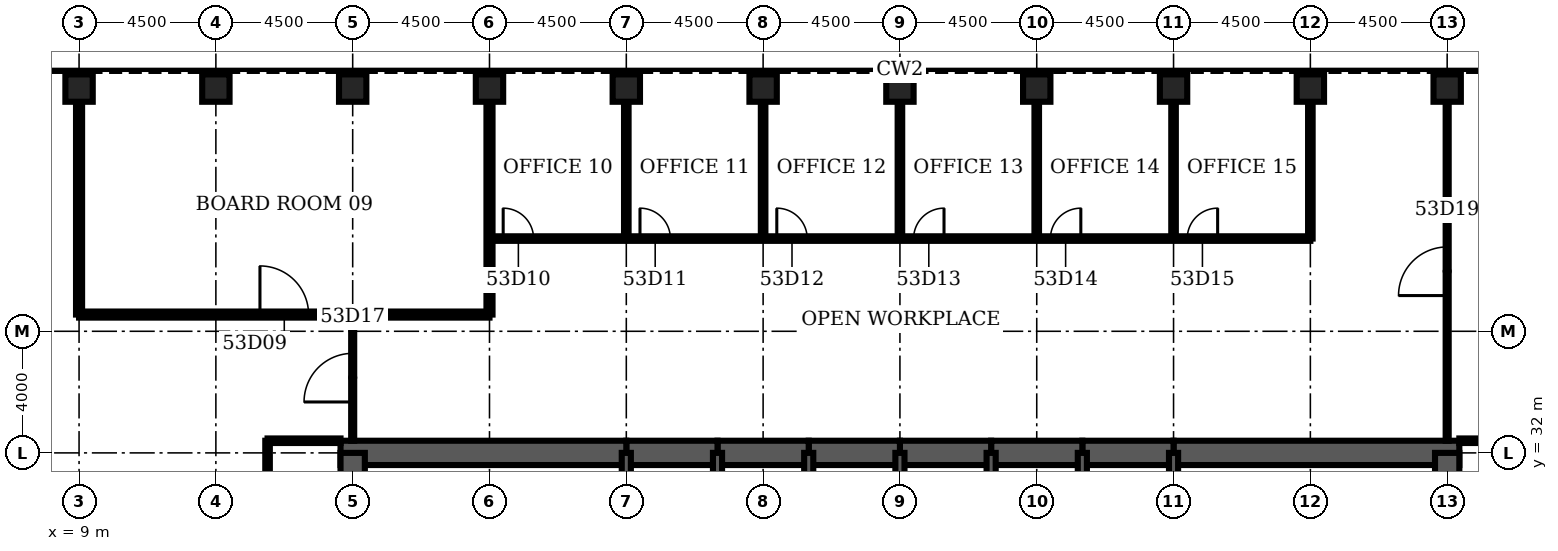
"""IFC4 building model, lengths in metres.
Left out: names, types, materials, properties, quantities, classifications, styles, units other than length and angle.
Written with IfcOpenShell. Run it as: python <this file> out.ifc"""

import sys

from ifc_helpers import new_model, si_unit, direction, frame, frame_2d, origin, origin_2d, place, context, subcontext, project, spatial, rectangle, hollow_rectangle, extrude, element, fill, save


model = new_model("IFC4")
c1 = context("Model", 3, precision=1e-05, world=origin(), true_north=direction((0.0, 1.0)))
c2 = subcontext(c1, "Body", "Model", "MODEL_VIEW")
j1 = project(units=[si_unit("LENGTHUNIT", "METRE"), si_unit("PLANEANGLEUNIT", "RADIAN")], contexts=[c1])
p1 = place(None, origin())
s1 = spatial("IfcSite", under=j1, at=p1, CompositionType="ELEMENT")
p2 = place(p1, origin())
s2 = spatial("IfcBuilding", under=s1, at=p2, CompositionType="ELEMENT")
p3 = place(p2, frame((0.0, 0.0, 236.2)))
s3 = spatial("IfcBuildingStorey", under=s2, at=p3, CompositionType="ELEMENT", Elevation=236.2)
for number, where, z_axis, x_axis in (
    (1, (54.0, 44.0, 0.0), (0.0, 0.0, 1.0), (0.0, 1.0, 0.0)),
    (2, (49.5, 44.0, 0.0), (0.0, 0.0, 1.0), (0.0, 1.0, 0.0)),
    (3, (45.0, 44.0, 0.0), (0.0, 0.0, 1.0), (0.0, 1.0, 0.0)),
    (4, (40.5, 44.0, 0.0), (0.0, 0.0, 1.0), (0.0, 1.0, 0.0)),
    (5, (36.0, 44.0, 0.0), (0.0, 0.0, 1.0), (0.0, 1.0, 0.0)),
    (6, (31.5, 44.0, 0.0), (0.0, 0.0, 1.0), (0.0, 1.0, 0.0)),
    (7, (27.0, 44.0, 0.0), (0.0, 0.0, 1.0), (0.0, 1.0, 0.0)),
    (8, (22.5, 44.0, 0.0), (0.0, 0.0, 1.0), (0.0, 1.0, 0.0)),
    (9, (18.0, 44.0, 0.0), (0.0, 0.0, 1.0), (0.0, 1.0, 0.0)),
    (10, (13.5, 44.0, 0.0), (0.0, 0.0, 1.0), (0.0, 1.0, 0.0)),
    (11, (9.0, 44.0, 0.0), (0.0, 0.0, 1.0), (0.0, 1.0, 0.0)),
):
    element("IfcColumn", number, at=place(p3, frame(where, z_axis=z_axis, x_axis=x_axis)), inside=s3, PredefinedType="COLUMN", context=c2, shape_type="SweptSolid", body=[
        extrude(hollow_rectangle(XDim=0.9, YDim=0.9, WallThickness=0.08, at=origin_2d()), origin(), (0.0, 0.0, 1.0), 4.2),
    ])
p4 = place(p3, frame((54.4, 32.0, 0.0), z_axis=(0.0, 0.0, 1.0), x_axis=(-1.0, 0.0, 0.0)))
e12 = element("IfcWall", 12, at=p4, inside=s3, PredefinedType="SHEAR", context=c2, shape_type="SweptSolid", body=[
    extrude(rectangle(XDim=9.4, YDim=0.8, at=frame_2d((4.7, 0.0))), origin(), (0.0, 0.0, 1.0), 4.2),
])
for number, where, z_axis, x_axis in (
    (13, (45.0, 32.0, 0.0), (0.0, 0.0, 1.0), (-1.0, 0.0, 0.0)),
    (14, (42.0, 32.0, 0.0), (0.0, 0.0, 1.0), (-1.0, 0.0, 0.0)),
    (15, (39.0, 32.0, 0.0), (0.0, 0.0, 1.0), (-1.0, 0.0, 0.0)),
    (16, (36.0, 32.0, 0.0), (0.0, 0.0, 1.0), (-1.0, 0.0, 0.0)),
    (17, (33.0, 32.0, 0.0), (0.0, 0.0, 1.0), (-1.0, 0.0, 0.0)),
    (18, (30.0, 32.0, 0.0), (0.0, 0.0, 1.0), (-1.0, 0.0, 0.0)),
):
    element("IfcWall", number, at=place(p3, frame(where, z_axis=z_axis, x_axis=x_axis)), inside=s3, PredefinedType="SHEAR", context=c2, shape_type="SweptSolid", body=[
        extrude(rectangle(XDim=3.0, YDim=0.8, at=frame_2d((1.5, 0.0))), origin(), (0.0, 0.0, 1.0), 4.2),
    ])
p5 = place(p3, frame((27.0, 32.0, 0.0), z_axis=(0.0, 0.0, 1.0), x_axis=(-1.0, 0.0, 0.0)))
e19 = element("IfcWall", 19, at=p5, inside=s3, PredefinedType="SHEAR", context=c2, shape_type="SweptSolid", body=[
    extrude(rectangle(XDim=9.4, YDim=0.8, at=frame_2d((4.7, 0.0))), origin(), (0.0, 0.0, 1.0), 4.2),
])
for number, where, z_axis, x_axis in (
    (20, (18.0, 32.0, 0.0), (0.0, 0.0, 1.0), (0.0, -1.0, 0.0)),
    (21, (54.0, 28.8, 0.0), (0.0, 0.0, 1.0), (0.0, 1.0, 0.0)),
):
    element("IfcWall", number, at=place(p3, frame(where, z_axis=z_axis, x_axis=x_axis)), inside=s3, PredefinedType="SHEAR", context=c2, shape_type="SweptSolid", body=[
        extrude(rectangle(XDim=3.2, YDim=0.8, at=frame_2d((1.6, 0.0))), origin(), (0.0, 0.0, 1.0), 4.2),
    ])
for number, where, z_axis, x_axis in (
    (22, (27.0, 28.8, 0.0), (0.0, 0.0, 1.0), (0.0, 1.0, 0.0)),
    (23, (30.0, 28.8, 0.0), (0.0, 0.0, 1.0), (0.0, 1.0, 0.0)),
    (24, (33.0, 28.8, 0.0), (0.0, 0.0, 1.0), (0.0, 1.0, 0.0)),
    (25, (36.0, 28.8, 0.0), (0.0, 0.0, 1.0), (0.0, 1.0, 0.0)),
    (26, (39.0, 28.8, 0.0), (0.0, 0.0, 1.0), (0.0, 1.0, 0.0)),
    (27, (42.0, 28.8, 0.0), (0.0, 0.0, 1.0), (0.0, 1.0, 0.0)),
    (28, (45.0, 28.8, 0.0), (0.0, 0.0, 1.0), (0.0, 1.0, 0.0)),
):
    element("IfcWall", number, at=place(p3, frame(where, z_axis=z_axis, x_axis=x_axis)), inside=s3, PredefinedType="SOLIDWALL", context=c2, shape_type="SweptSolid", body=[
        extrude(rectangle(XDim=3.2, YDim=0.3, at=frame_2d((1.6, 0.0))), origin(), (0.0, 0.0, 1.0), 4.2),
    ])
for number, where, z_axis, x_axis in (
    (29, (15.2, 32.4, 0.0), (0.0, 0.0, 1.0), (1.0, 0.0, 0.0)),
    (30, (54.4, 32.4, 0.0), (0.0, 0.0, 1.0), (1.0, 0.0, 0.0)),
):
    element("IfcWall", number, at=place(p3, frame(where, z_axis=z_axis, x_axis=x_axis)), inside=s3, PredefinedType="PARTITIONING", context=c2, shape_type="SweptSolid", body=[
        extrude(rectangle(XDim=2.4, YDim=0.15, at=frame_2d((1.2, 0.0))), origin(), (0.0, 0.0, 1.0), 3.0),
    ])
p6 = place(p3, frame((9.0, 36.55, 0.0), z_axis=(0.0, 0.0, 1.0), x_axis=(1.0, 0.0, 0.0)))
e31 = element("IfcWall", 31, at=p6, inside=s3, PredefinedType="PARTITIONING", context=c2, shape_type="SweptSolid", body=[
    extrude(rectangle(XDim=13.5, YDim=0.2, at=frame_2d((6.75, 0.0))), origin(), (0.0, 0.0, 1.0), 3.0),
])
p7 = place(p6, frame((5.95, 0.0, 0.0)))
e32 = element("IfcOpeningElement", 32, at=p7, cuts=e31, PredefinedType="OPENING", context=c2, shape_type="SweptSolid", body=[
    extrude(rectangle(XDim=1.6, YDim=2.1, at=frame_2d((0.8, 1.05))), frame((0.0, 0.11, 0.0), z_axis=(0.0, -1.0, 0.0), x_axis=(1.0, 0.0, 0.0)), (0.0, 0.0, 1.0), 0.22),
])
p8 = place(p3, frame((22.5, 39.05, 0.0), z_axis=(0.0, 0.0, 1.0), x_axis=(1.0, 0.0, 0.0)))
e33 = element("IfcWall", 33, at=p8, inside=s3, PredefinedType="PARTITIONING", context=c2, shape_type="SweptSolid", body=[
    extrude(rectangle(XDim=27.0, YDim=0.15, at=frame_2d((13.5, 0.0))), origin(), (0.0, 0.0, 1.0), 3.0),
])
p9 = place(p8, frame((0.45, 0.0, 0.0)))
e34 = element("IfcOpeningElement", 34, at=p9, cuts=e33, PredefinedType="OPENING", context=c2, shape_type="SweptSolid", body=[
    extrude(rectangle(XDim=1.0, YDim=2.1, at=frame_2d((0.5, 1.05))), frame((0.0, 0.085, 0.0), z_axis=(0.0, -1.0, 0.0), x_axis=(1.0, 0.0, 0.0)), (0.0, 0.0, 1.0), 0.17),
])
p10 = place(p8, frame((4.95, 0.0, 0.0)))
e35 = element("IfcOpeningElement", 35, at=p10, cuts=e33, PredefinedType="OPENING", context=c2, shape_type="SweptSolid", body=[
    extrude(rectangle(XDim=1.0, YDim=2.1, at=frame_2d((0.5, 1.05))), frame((0.0, 0.085, 0.0), z_axis=(0.0, -1.0, 0.0), x_axis=(1.0, 0.0, 0.0)), (0.0, 0.0, 1.0), 0.17),
])
p11 = place(p8, frame((9.45, 0.0, 0.0)))
e36 = element("IfcOpeningElement", 36, at=p11, cuts=e33, PredefinedType="OPENING", context=c2, shape_type="SweptSolid", body=[
    extrude(rectangle(XDim=1.0, YDim=2.1, at=frame_2d((0.5, 1.05))), frame((0.0, 0.085, 0.0), z_axis=(0.0, -1.0, 0.0), x_axis=(1.0, 0.0, 0.0)), (0.0, 0.0, 1.0), 0.17),
])
p12 = place(p8, frame((13.95, 0.0, 0.0)))
e37 = element("IfcOpeningElement", 37, at=p12, cuts=e33, PredefinedType="OPENING", context=c2, shape_type="SweptSolid", body=[
    extrude(rectangle(XDim=1.0, YDim=2.1, at=frame_2d((0.5, 1.05))), frame((0.0, 0.085, 0.0), z_axis=(0.0, -1.0, 0.0), x_axis=(1.0, 0.0, 0.0)), (0.0, 0.0, 1.0), 0.17),
])
p13 = place(p8, frame((18.45, 0.0, 0.0)))
e38 = element("IfcOpeningElement", 38, at=p13, cuts=e33, PredefinedType="OPENING", context=c2, shape_type="SweptSolid", body=[
    extrude(rectangle(XDim=1.0, YDim=2.1, at=frame_2d((0.5, 1.05))), frame((0.0, 0.085, 0.0), z_axis=(0.0, -1.0, 0.0), x_axis=(1.0, 0.0, 0.0)), (0.0, 0.0, 1.0), 0.17),
])
p14 = place(p8, frame((22.95, 0.0, 0.0)))
e39 = element("IfcOpeningElement", 39, at=p14, cuts=e33, PredefinedType="OPENING", context=c2, shape_type="SweptSolid", body=[
    extrude(rectangle(XDim=1.0, YDim=2.1, at=frame_2d((0.5, 1.05))), frame((0.0, 0.085, 0.0), z_axis=(0.0, -1.0, 0.0), x_axis=(1.0, 0.0, 0.0)), (0.0, 0.0, 1.0), 0.17),
])
p15 = place(p3, frame((9.0, 36.55, 0.0), z_axis=(0.0, 0.0, 1.0), x_axis=(0.0, 1.0, 0.0)))
e40 = element("IfcWall", 40, at=p15, inside=s3, PredefinedType="PARTITIONING", context=c2, shape_type="SweptSolid", body=[
    extrude(rectangle(XDim=7.0, YDim=0.2, at=frame_2d((3.5, 0.0))), origin(), (0.0, 0.0, 1.0), 3.0),
])
p16 = place(p3, frame((15.2, 13.8, 0.0), z_axis=(0.0, 0.0, 1.0), x_axis=(0.0, 1.0, 0.0)))
e41 = element("IfcWall", 41, at=p16, inside=s3, PredefinedType="PARTITIONING", context=c2, shape_type="SweptSolid", body=[
    extrude(rectangle(XDim=18.6, YDim=0.15, at=frame_2d((9.3, 0.0))), origin(), (0.0, 0.0, 1.0), 3.0),
])
p17 = place(p16, frame((8.7, 0.0, 0.0)))
e42 = element("IfcOpeningElement", 42, at=p17, cuts=e41, PredefinedType="OPENING", context=c2, shape_type="SweptSolid", body=[
    extrude(rectangle(XDim=1.2, YDim=2.1, at=frame_2d((0.6, 1.05))), frame((0.0, 0.085, 0.0), z_axis=(0.0, -1.0, 0.0), x_axis=(1.0, 0.0, 0.0)), (0.0, 0.0, 1.0), 0.17),
])
p18 = place(p3, frame((18.0, 32.4, 0.0), z_axis=(0.0, 0.0, 1.0), x_axis=(0.0, 1.0, 0.0)))
e43 = element("IfcWall", 43, at=p18, inside=s3, PredefinedType="PARTITIONING", context=c2, shape_type="SweptSolid", body=[
    extrude(rectangle(XDim=4.15, YDim=0.1, at=frame_2d((2.075, 0.0))), origin(), (0.0, 0.0, 1.0), 3.0),
])
p19 = place(p18, frame((1.275, 0.0, 0.0)))
e44 = element("IfcOpeningElement", 44, at=p19, cuts=e43, PredefinedType="OPENING", context=c2, shape_type="SweptSolid", body=[
    extrude(rectangle(XDim=1.6, YDim=2.1, at=frame_2d((0.8, 1.05))), frame((0.0, 0.06, 0.0), z_axis=(0.0, -1.0, 0.0), x_axis=(1.0, 0.0, 0.0)), (0.0, 0.0, 1.0), 0.12),
])
p20 = place(p3, frame((22.5, 36.55, 0.0), z_axis=(0.0, 0.0, 1.0), x_axis=(0.0, 1.0, 0.0)))
e45 = element("IfcWall", 45, at=p20, inside=s3, PredefinedType="PARTITIONING", context=c2, shape_type="SweptSolid", body=[
    extrude(rectangle(XDim=7.0, YDim=0.2, at=frame_2d((3.5, 0.0))), origin(), (0.0, 0.0, 1.0), 3.0),
])
for number, where, z_axis, x_axis in (
    (46, (27.0, 39.05, 0.0), (0.0, 0.0, 1.0), (0.0, 1.0, 0.0)),
    (47, (31.5, 39.05, 0.0), (0.0, 0.0, 1.0), (0.0, 1.0, 0.0)),
    (48, (36.0, 39.05, 0.0), (0.0, 0.0, 1.0), (0.0, 1.0, 0.0)),
    (49, (40.5, 39.05, 0.0), (0.0, 0.0, 1.0), (0.0, 1.0, 0.0)),
    (50, (45.0, 39.05, 0.0), (0.0, 0.0, 1.0), (0.0, 1.0, 0.0)),
    (51, (49.5, 39.05, 0.0), (0.0, 0.0, 1.0), (0.0, 1.0, 0.0)),
):
    element("IfcWall", number, at=place(p3, frame(where, z_axis=z_axis, x_axis=x_axis)), inside=s3, PredefinedType="PARTITIONING", context=c2, shape_type="SweptSolid", body=[
        extrude(rectangle(XDim=4.5, YDim=0.15, at=frame_2d((2.25, 0.0))), origin(), (0.0, 0.0, 1.0), 3.0),
    ])
p21 = place(p3, frame((54.0, 32.4, 0.0), z_axis=(0.0, 0.0, 1.0), x_axis=(0.0, 1.0, 0.0)))
e52 = element("IfcWall", 52, at=p21, inside=s3, PredefinedType="PARTITIONING", context=c2, shape_type="SweptSolid", body=[
    extrude(rectangle(XDim=11.15, YDim=0.1, at=frame_2d((5.575, 0.0))), origin(), (0.0, 0.0, 1.0), 3.0),
])
p22 = place(p21, frame((4.775, 0.0, 0.0)))
e53 = element("IfcOpeningElement", 53, at=p22, cuts=e52, PredefinedType="OPENING", context=c2, shape_type="SweptSolid", body=[
    extrude(rectangle(XDim=1.6, YDim=2.1, at=frame_2d((0.8, 1.05))), frame((0.0, 0.06, 0.0), z_axis=(0.0, -1.0, 0.0), x_axis=(1.0, 0.0, 0.0)), (0.0, 0.0, 1.0), 0.12),
])
p23 = place(p7, origin())
e54 = element("IfcDoor", 54, at=p23, inside=s3, OperationType="SINGLE_SWING_LEFT", PredefinedType="DOOR", context=c2, shape_type="SweptSolid", body=[
    extrude(rectangle(XDim=1.6, YDim=2.1, at=frame_2d((0.8, 1.05))), frame((0.0, 0.025, 0.0), z_axis=(0.0, -1.0, 0.0), x_axis=(1.0, 0.0, 0.0)), (0.0, 0.0, 1.0), 0.05),
])
fill(e32, e54)
p24 = place(p9, origin())
e55 = element("IfcDoor", 55, at=p24, inside=s3, OperationType="SINGLE_SWING_LEFT", PredefinedType="DOOR", context=c2, shape_type="SweptSolid", body=[
    extrude(rectangle(XDim=1.0, YDim=2.1, at=frame_2d((0.5, 1.05))), frame((0.0, 0.025, 0.0), z_axis=(0.0, -1.0, 0.0), x_axis=(1.0, 0.0, 0.0)), (0.0, 0.0, 1.0), 0.05),
])
fill(e34, e55)
p25 = place(p10, origin())
e56 = element("IfcDoor", 56, at=p25, inside=s3, OperationType="SINGLE_SWING_LEFT", PredefinedType="DOOR", context=c2, shape_type="SweptSolid", body=[
    extrude(rectangle(XDim=1.0, YDim=2.1, at=frame_2d((0.5, 1.05))), frame((0.0, 0.025, 0.0), z_axis=(0.0, -1.0, 0.0), x_axis=(1.0, 0.0, 0.0)), (0.0, 0.0, 1.0), 0.05),
])
fill(e35, e56)
p26 = place(p11, origin())
e57 = element("IfcDoor", 57, at=p26, inside=s3, OperationType="SINGLE_SWING_LEFT", PredefinedType="DOOR", context=c2, shape_type="SweptSolid", body=[
    extrude(rectangle(XDim=1.0, YDim=2.1, at=frame_2d((0.5, 1.05))), frame((0.0, 0.025, 0.0), z_axis=(0.0, -1.0, 0.0), x_axis=(1.0, 0.0, 0.0)), (0.0, 0.0, 1.0), 0.05),
])
fill(e36, e57)
p27 = place(p12, origin())
e58 = element("IfcDoor", 58, at=p27, inside=s3, OperationType="SINGLE_SWING_RIGHT", PredefinedType="DOOR", context=c2, shape_type="SweptSolid", body=[
    extrude(rectangle(XDim=1.0, YDim=2.1, at=frame_2d((0.5, 1.05))), frame((0.0, 0.025, 0.0), z_axis=(0.0, -1.0, 0.0), x_axis=(1.0, 0.0, 0.0)), (0.0, 0.0, 1.0), 0.05),
])
fill(e37, e58)
p28 = place(p13, origin())
e59 = element("IfcDoor", 59, at=p28, inside=s3, OperationType="SINGLE_SWING_RIGHT", PredefinedType="DOOR", context=c2, shape_type="SweptSolid", body=[
    extrude(rectangle(XDim=1.0, YDim=2.1, at=frame_2d((0.5, 1.05))), frame((0.0, 0.025, 0.0), z_axis=(0.0, -1.0, 0.0), x_axis=(1.0, 0.0, 0.0)), (0.0, 0.0, 1.0), 0.05),
])
fill(e38, e59)
p29 = place(p14, origin())
e60 = element("IfcDoor", 60, at=p29, inside=s3, OperationType="SINGLE_SWING_RIGHT", PredefinedType="DOOR", context=c2, shape_type="SweptSolid", body=[
    extrude(rectangle(XDim=1.0, YDim=2.1, at=frame_2d((0.5, 1.05))), frame((0.0, 0.025, 0.0), z_axis=(0.0, -1.0, 0.0), x_axis=(1.0, 0.0, 0.0)), (0.0, 0.0, 1.0), 0.05),
])
fill(e39, e60)
p30 = place(p19, origin())
e61 = element("IfcDoor", 61, at=p30, inside=s3, OperationType="SINGLE_SWING_LEFT", PredefinedType="DOOR", context=c2, shape_type="SweptSolid", body=[
    extrude(rectangle(XDim=1.6, YDim=2.1, at=frame_2d((0.8, 1.05))), frame((0.0, 0.025, 0.0), z_axis=(0.0, -1.0, 0.0), x_axis=(1.0, 0.0, 0.0)), (0.0, 0.0, 1.0), 0.05),
])
fill(e44, e61)
p31 = place(p22, origin())
e62 = element("IfcDoor", 62, at=p31, inside=s3, OperationType="SINGLE_SWING_LEFT", PredefinedType="DOOR", context=c2, shape_type="SweptSolid", body=[
    extrude(rectangle(XDim=1.6, YDim=2.1, at=frame_2d((0.8, 1.05))), frame((0.0, 0.025, 0.0), z_axis=(0.0, -1.0, 0.0), x_axis=(1.0, 0.0, 0.0)), (0.0, 0.0, 1.0), 0.05),
])
fill(e53, e62)
save(model, sys.argv[1])
